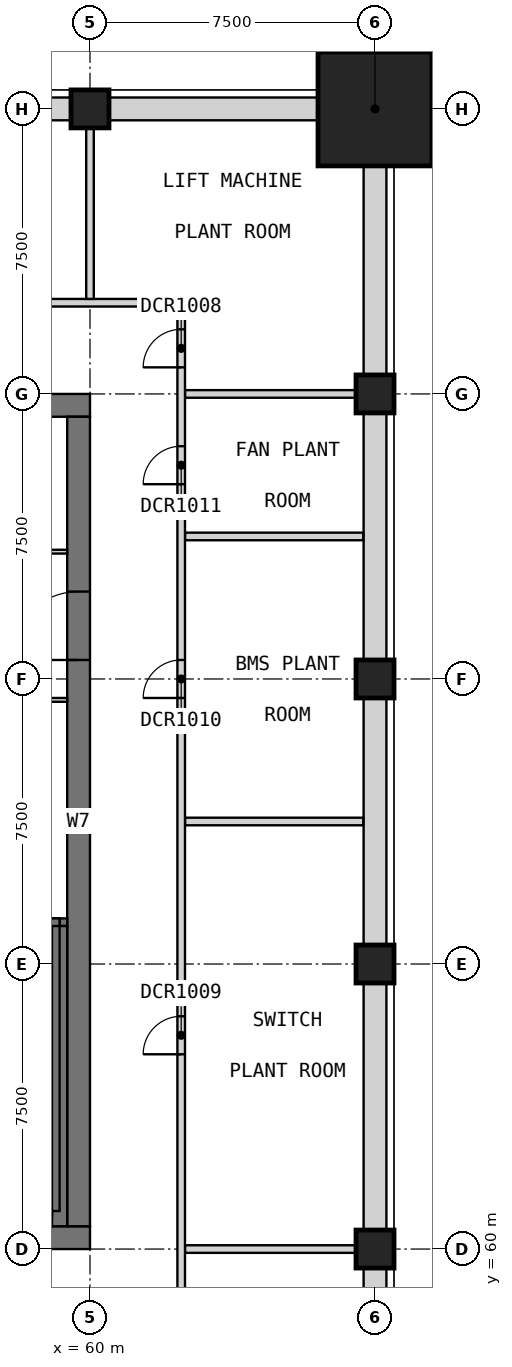
"""IFC4 building model, lengths in metres.
Left out: names, types, materials, properties, quantities, classifications, styles, units other than length and angle.
Written with IfcOpenShell. Run it as: python <this file> out.ifc"""

import sys

from ifc_helpers import new_model, si_unit, direction, frame, frame_2d, origin, origin_2d, place, context, subcontext, project, spatial, rectangle, extrude, element, fill, save


model = new_model("IFC4")
c1 = context("Model", 3, precision=1e-05, world=origin(), true_north=direction((0.0, 1.0)))
c2 = subcontext(c1, "Body", "Model", "MODEL_VIEW")
j1 = project(units=[si_unit("LENGTHUNIT", "METRE"), si_unit("PLANEANGLEUNIT", "RADIAN")], contexts=[c1])
p1 = place(None, origin())
s1 = spatial("IfcSite", under=j1, at=p1, CompositionType="ELEMENT")
p2 = place(p1, origin())
s2 = spatial("IfcBuilding", under=s1, at=p2, CompositionType="ELEMENT")
p3 = place(p2, frame((0.0, 0.0, 320.2)))
s3 = spatial("IfcBuildingStorey", under=s2, at=p3, CompositionType="ELEMENT", Elevation=320.2)
for number, where, z_axis, x_axis in (
    (1, (60.0, 90.0, 0.0), (0.0, 0.0, 1.0), (1.0, 0.0, 0.0)),
    (2, (67.5, 60.0, 0.0), (0.0, 0.0, 1.0), (1.0, 0.0, 0.0)),
    (3, (67.5, 67.5, 0.0), (0.0, 0.0, 1.0), (1.0, 0.0, 0.0)),
    (4, (67.5, 75.0, 0.0), (0.0, 0.0, 1.0), (1.0, 0.0, 0.0)),
    (5, (67.5, 82.5, 0.0), (0.0, 0.0, 1.0), (1.0, 0.0, 0.0)),
):
    element("IfcColumn", number, at=place(p3, frame(where, z_axis=z_axis, x_axis=x_axis)), inside=s3, PredefinedType="COLUMN", context=c2, shape_type="SweptSolid", body=[
        extrude(rectangle(XDim=1.0, YDim=1.0, at=origin_2d()), origin(), (0.0, 0.0, 1.0), 8.0),
    ])
p4 = place(p3, frame((67.5, 90.0, 0.0), z_axis=(0.0, 0.0, 1.0), x_axis=(1.0, 0.0, 0.0)))
e6 = element("IfcColumn", 6, at=p4, inside=s3, PredefinedType="COLUMN", context=c2, shape_type="SweptSolid", body=[
    extrude(rectangle(XDim=3.0, YDim=3.0, at=origin_2d()), origin(), (0.0, 0.0, 1.0), 8.0),
])
p5 = place(p3, frame((30.0, 60.3, 0.0), z_axis=(0.0, 0.0, 1.0), x_axis=(1.0, 0.0, 0.0)))
e7 = element("IfcWall", 7, at=p5, inside=s3, PredefinedType="SHEAR", context=c2, shape_type="SweptSolid", body=[
    extrude(rectangle(XDim=30.0, YDim=0.6, at=frame_2d((15.0, 0.0))), origin(), (0.0, 0.0, 1.0), 7.7),
])
p6 = place(p5, frame((21.9, 0.0, 0.0)))
e8 = element("IfcOpeningElement", 8, at=p6, cuts=e7, PredefinedType="OPENING", context=c2, shape_type="SweptSolid", body=[
    extrude(rectangle(XDim=1.8, YDim=2.1, at=frame_2d((0.9, 1.05))), frame((0.0, 0.31, 0.0), z_axis=(0.0, -1.0, 0.0), x_axis=(1.0, 0.0, 0.0)), (0.0, 0.0, 1.0), 0.62),
])
p7 = place(p5, frame((26.5, 0.0, 0.0)))
e9 = element("IfcOpeningElement", 9, at=p7, cuts=e7, PredefinedType="OPENING", context=c2, shape_type="SweptSolid", body=[
    extrude(rectangle(XDim=1.2, YDim=2.1, at=frame_2d((0.6, 1.05))), frame((0.0, 0.31, 0.0), z_axis=(0.0, -1.0, 0.0), x_axis=(1.0, 0.0, 0.0)), (0.0, 0.0, 1.0), 0.62),
])
p8 = place(p3, frame((30.0, 82.2, 0.0), z_axis=(0.0, 0.0, 1.0), x_axis=(1.0, 0.0, 0.0)))
e10 = element("IfcWall", 10, at=p8, inside=s3, PredefinedType="SHEAR", context=c2, shape_type="SweptSolid", body=[
    extrude(rectangle(XDim=30.0, YDim=0.6, at=frame_2d((15.0, 0.0))), origin(), (0.0, 0.0, 1.0), 7.7),
])
p9 = place(p3, frame((59.7, 60.6, 0.0), z_axis=(0.0, 0.0, 1.0), x_axis=(0.0, 1.0, 0.0)))
e11 = element("IfcWall", 11, at=p9, inside=s3, PredefinedType="SHEAR", context=c2, shape_type="SweptSolid", body=[
    extrude(rectangle(XDim=21.3, YDim=0.6, at=frame_2d((10.65, 0.0))), origin(), (0.0, 0.0, 1.0), 7.7),
])
p10 = place(p9, frame((14.9, 0.0, 0.0)))
e12 = element("IfcOpeningElement", 12, at=p10, cuts=e11, PredefinedType="OPENING", context=c2, shape_type="SweptSolid", body=[
    extrude(rectangle(XDim=1.8, YDim=2.1, at=frame_2d((0.9, 1.05))), frame((0.0, 0.31, 0.0), z_axis=(0.0, -1.0, 0.0), x_axis=(1.0, 0.0, 0.0)), (0.0, 0.0, 1.0), 0.62),
])
p11 = place(p3, frame((67.5, 54.0, 0.0), z_axis=(0.0, 0.0, 1.0), x_axis=(0.0, 1.0, 0.0)))
e13 = element("IfcWall", 13, at=p11, inside=s3, PredefinedType="ELEMENTEDWALL", context=c2, shape_type="SweptSolid", body=[
    extrude(rectangle(XDim=5.5, YDim=0.6, at=frame_2d((2.75, 0.0))), origin(), (0.0, 0.0, 1.0), 7.7),
])
for number, where, z_axis, x_axis in (
    (14, (67.5, 60.5, 0.0), (0.0, 0.0, 1.0), (0.0, 1.0, 0.0)),
    (15, (67.5, 68.0, 0.0), (0.0, 0.0, 1.0), (0.0, 1.0, 0.0)),
    (16, (67.5, 75.5, 0.0), (0.0, 0.0, 1.0), (0.0, 1.0, 0.0)),
):
    element("IfcWall", number, at=place(p3, frame(where, z_axis=z_axis, x_axis=x_axis)), inside=s3, PredefinedType="ELEMENTEDWALL", context=c2, shape_type="SweptSolid", body=[
        extrude(rectangle(XDim=6.5, YDim=0.6, at=frame_2d((3.25, 0.0))), origin(), (0.0, 0.0, 1.0), 6.8),
    ])
for number, where, z_axis, x_axis in (
    (17, (67.5, 83.0, 0.0), (0.0, 0.0, 1.0), (0.0, 1.0, 0.0)),
    (18, (66.0, 90.0, 0.0), (0.0, 0.0, 1.0), (-1.0, 0.0, 0.0)),
):
    element("IfcWall", number, at=place(p3, frame(where, z_axis=z_axis, x_axis=x_axis)), inside=s3, PredefinedType="ELEMENTEDWALL", context=c2, shape_type="SweptSolid", body=[
        extrude(rectangle(XDim=5.5, YDim=0.6, at=frame_2d((2.75, 0.0))), origin(), (0.0, 0.0, 1.0), 7.7),
    ])
p12 = place(p3, frame((59.5, 90.0, 0.0), z_axis=(0.0, 0.0, 1.0), x_axis=(-1.0, 0.0, 0.0)))
e19 = element("IfcWall", 19, at=p12, inside=s3, PredefinedType="ELEMENTEDWALL", context=c2, shape_type="SweptSolid", body=[
    extrude(rectangle(XDim=6.5, YDim=0.6, at=frame_2d((3.25, 0.0))), origin(), (0.0, 0.0, 1.0), 6.8),
])
p13 = place(p3, frame((51.1, 68.6, 0.0), z_axis=(0.0, 0.0, 1.0), x_axis=(1.0, 0.0, 0.0)))
e20 = element("IfcWall", 20, at=p13, inside=s3, PredefinedType="SOLIDWALL", context=c2, shape_type="SweptSolid", body=[
    extrude(rectangle(XDim=8.3, YDim=0.2, at=frame_2d((4.15, 0.0))), origin(), (0.0, 0.0, 1.0), 7.7),
])
p14 = place(p3, frame((59.2, 60.6, 0.0), z_axis=(0.0, 0.0, 1.0), x_axis=(0.0, 1.0, 0.0)))
e21 = element("IfcWall", 21, at=p14, inside=s3, PredefinedType="SOLIDWALL", context=c2, shape_type="SweptSolid", body=[
    extrude(rectangle(XDim=7.9, YDim=0.4, at=frame_2d((3.95, 0.0))), origin(), (0.0, 0.0, 1.0), 7.7),
])
p15 = place(p3, frame((51.1, 74.45, 0.0), z_axis=(0.0, 0.0, 1.0), x_axis=(1.0, 0.0, 0.0)))
e22 = element("IfcWall", 22, at=p15, inside=s3, PredefinedType="PARTITIONING", context=c2, shape_type="SweptSolid", body=[
    extrude(rectangle(XDim=8.3, YDim=0.1, at=frame_2d((4.15, 0.0))), origin(), (0.0, 0.0, 1.0), 7.7),
])
p16 = place(p15, frame((3.7, 0.0, 0.0)))
e23 = element("IfcOpeningElement", 23, at=p16, cuts=e22, PredefinedType="OPENING", context=c2, shape_type="SweptSolid", body=[
    extrude(rectangle(XDim=0.9, YDim=2.1, at=frame_2d((0.45, 1.05))), frame((0.0, 0.06, 0.0), z_axis=(0.0, -1.0, 0.0), x_axis=(1.0, 0.0, 0.0)), (0.0, 0.0, 1.0), 0.12),
])
p17 = place(p3, frame((51.1, 78.35, 0.0), z_axis=(0.0, 0.0, 1.0), x_axis=(1.0, 0.0, 0.0)))
e24 = element("IfcWall", 24, at=p17, inside=s3, PredefinedType="PARTITIONING", context=c2, shape_type="SweptSolid", body=[
    extrude(rectangle(XDim=8.3, YDim=0.1, at=frame_2d((4.15, 0.0))), origin(), (0.0, 0.0, 1.0), 7.7),
])
p18 = place(p17, frame((2.05, 0.0, 0.0)))
e25 = element("IfcOpeningElement", 25, at=p18, cuts=e24, PredefinedType="OPENING", context=c2, shape_type="SweptSolid", body=[
    extrude(rectangle(XDim=0.9, YDim=2.1, at=frame_2d((0.45, 1.05))), frame((0.0, 0.06, 0.0), z_axis=(0.0, -1.0, 0.0), x_axis=(1.0, 0.0, 0.0)), (0.0, 0.0, 1.0), 0.12),
])
p19 = place(p17, frame((6.2, 0.0, 0.0)))
e26 = element("IfcOpeningElement", 26, at=p19, cuts=e24, PredefinedType="OPENING", context=c2, shape_type="SweptSolid", body=[
    extrude(rectangle(XDim=0.9, YDim=2.1, at=frame_2d((0.45, 1.05))), frame((0.0, 0.06, 0.0), z_axis=(0.0, -1.0, 0.0), x_axis=(1.0, 0.0, 0.0)), (0.0, 0.0, 1.0), 0.12),
])
p20 = place(p3, frame((59.1, 61.0, 8.0), z_axis=(0.0, 0.0, 1.0), x_axis=(0.0, 1.0, 0.0)))
e27 = element("IfcWall", 27, at=p20, inside=s3, PredefinedType="SOLIDWALL", context=c2, shape_type="SweptSolid", body=[
    extrude(rectangle(XDim=7.7, YDim=0.2, at=frame_2d((3.85, 0.0))), origin(), (0.0, 0.0, 1.0), 2.7),
])
p21 = place(p3, frame((55.0, 68.6, 8.0), z_axis=(0.0, 0.0, 1.0), x_axis=(1.0, 0.0, 0.0)))
e28 = element("IfcWall", 28, at=p21, inside=s3, PredefinedType="SOLIDWALL", context=c2, shape_type="SweptSolid", body=[
    extrude(rectangle(XDim=4.2, YDim=0.2, at=frame_2d((2.1, 0.0))), origin(), (0.0, 0.0, 1.0), 2.7),
])
p22 = place(p3, frame((62.5, 60.0, 0.0), z_axis=(0.0, 0.0, 1.0), x_axis=(1.0, 0.0, 0.0)))
e29 = element("IfcWall", 29, at=p22, inside=s3, PredefinedType="PARTITIONING", context=c2, shape_type="SweptSolid", body=[
    extrude(rectangle(XDim=5.0, YDim=0.2, at=frame_2d((2.5, 0.0))), origin(), (0.0, 0.0, 1.0), 6.2),
])
for number, where, z_axis, x_axis in (
    (30, (62.5, 71.25, 0.0), (0.0, 0.0, 1.0), (1.0, 0.0, 0.0)),
    (31, (62.5, 78.75, 0.0), (0.0, 0.0, 1.0), (1.0, 0.0, 0.0)),
):
    element("IfcWall", number, at=place(p3, frame(where, z_axis=z_axis, x_axis=x_axis)), inside=s3, PredefinedType="PARTITIONING", context=c2, shape_type="SweptSolid", body=[
        extrude(rectangle(XDim=4.69, YDim=0.2, at=frame_2d((2.345, 0.0))), origin(), (0.0, 0.0, 1.0), 7.7),
    ])
p23 = place(p3, frame((62.5, 82.5, 0.0), z_axis=(0.0, 0.0, 1.0), x_axis=(1.0, 0.0, 0.0)))
e32 = element("IfcWall", 32, at=p23, inside=s3, PredefinedType="PARTITIONING", context=c2, shape_type="SweptSolid", body=[
    extrude(rectangle(XDim=5.0, YDim=0.2, at=frame_2d((2.5, 0.0))), origin(), (0.0, 0.0, 1.0), 6.2),
])
p24 = place(p3, frame((33.75, 84.9, 0.0), z_axis=(0.0, 0.0, 1.0), x_axis=(1.0, 0.0, 0.0)))
e33 = element("IfcWall", 33, at=p24, inside=s3, PredefinedType="PARTITIONING", context=c2, shape_type="SweptSolid", body=[
    extrude(rectangle(XDim=28.65, YDim=0.2, at=frame_2d((14.325, 0.0))), origin(), (0.0, 0.0, 1.0), 7.7),
])
p25 = place(p24, frame((1.375, 0.0, 0.0)))
e34 = element("IfcOpeningElement", 34, at=p25, cuts=e33, PredefinedType="OPENING", context=c2, shape_type="SweptSolid", body=[
    extrude(rectangle(XDim=1.0, YDim=2.1, at=frame_2d((0.5, 1.05))), frame((0.0, 0.11, 0.0), z_axis=(0.0, -1.0, 0.0), x_axis=(1.0, 0.0, 0.0)), (0.0, 0.0, 1.0), 0.22),
])
p26 = place(p24, frame((7.0, 0.0, 0.0)))
e35 = element("IfcOpeningElement", 35, at=p26, cuts=e33, PredefinedType="OPENING", context=c2, shape_type="SweptSolid", body=[
    extrude(rectangle(XDim=1.0, YDim=2.1, at=frame_2d((0.5, 1.05))), frame((0.0, 0.11, 0.0), z_axis=(0.0, -1.0, 0.0), x_axis=(1.0, 0.0, 0.0)), (0.0, 0.0, 1.0), 0.22),
])
p27 = place(p24, frame((18.25, 0.0, 0.0)))
e36 = element("IfcOpeningElement", 36, at=p27, cuts=e33, PredefinedType="OPENING", context=c2, shape_type="SweptSolid", body=[
    extrude(rectangle(XDim=1.0, YDim=2.1, at=frame_2d((0.5, 1.05))), frame((0.0, 0.11, 0.0), z_axis=(0.0, -1.0, 0.0), x_axis=(1.0, 0.0, 0.0)), (0.0, 0.0, 1.0), 0.22),
])
p28 = place(p3, frame((60.0, 85.0, 0.0), z_axis=(0.0, 0.0, 1.0), x_axis=(0.0, 1.0, 0.0)))
e37 = element("IfcWall", 37, at=p28, inside=s3, PredefinedType="PARTITIONING", context=c2, shape_type="SweptSolid", body=[
    extrude(rectangle(XDim=5.5, YDim=0.2, at=frame_2d((2.75, 0.0))), origin(), (0.0, 0.0, 1.0), 6.2),
])
p29 = place(p3, frame((62.4, 57.7, 0.0), z_axis=(0.0, 0.0, 1.0), x_axis=(0.0, 1.0, 0.0)))
e38 = element("IfcWall", 38, at=p29, inside=s3, PredefinedType="PARTITIONING", context=c2, shape_type="SweptSolid", body=[
    extrude(rectangle(XDim=27.1, YDim=0.2, at=frame_2d((13.55, 0.0))), origin(), (0.0, 0.0, 1.0), 7.7),
])
p30 = place(p29, frame((25.5, 0.0, 0.0)))
e39 = element("IfcOpeningElement", 39, at=p30, cuts=e38, PredefinedType="OPENING", context=c2, shape_type="SweptSolid", body=[
    extrude(rectangle(XDim=1.0, YDim=2.1, at=frame_2d((0.5, 1.05))), frame((0.0, 0.11, 0.0), z_axis=(0.0, -1.0, 0.0), x_axis=(1.0, 0.0, 0.0)), (0.0, 0.0, 1.0), 0.22),
])
p31 = place(p29, frame((7.425, 0.0, 0.0)))
e40 = element("IfcOpeningElement", 40, at=p31, cuts=e38, PredefinedType="OPENING", context=c2, shape_type="SweptSolid", body=[
    extrude(rectangle(XDim=1.0, YDim=2.1, at=frame_2d((0.5, 1.05))), frame((0.0, 0.11, 0.0), z_axis=(0.0, -1.0, 0.0), x_axis=(1.0, 0.0, 0.0)), (0.0, 0.0, 1.0), 0.22),
])
p32 = place(p29, frame((16.8, 0.0, 0.0)))
e41 = element("IfcOpeningElement", 41, at=p32, cuts=e38, PredefinedType="OPENING", context=c2, shape_type="SweptSolid", body=[
    extrude(rectangle(XDim=1.0, YDim=2.1, at=frame_2d((0.5, 1.05))), frame((0.0, 0.11, 0.0), z_axis=(0.0, -1.0, 0.0), x_axis=(1.0, 0.0, 0.0)), (0.0, 0.0, 1.0), 0.22),
])
p33 = place(p29, frame((22.425, 0.0, 0.0)))
e42 = element("IfcOpeningElement", 42, at=p33, cuts=e38, PredefinedType="OPENING", context=c2, shape_type="SweptSolid", body=[
    extrude(rectangle(XDim=1.0, YDim=2.1, at=frame_2d((0.5, 1.05))), frame((0.0, 0.11, 0.0), z_axis=(0.0, -1.0, 0.0), x_axis=(1.0, 0.0, 0.0)), (0.0, 0.0, 1.0), 0.22),
])
p34 = place(p10, origin())
e43 = element("IfcDoor", 43, at=p34, inside=s3, OperationType="DOUBLE_DOOR_SINGLE_SWING", PredefinedType="DOOR", context=c2, shape_type="SweptSolid", body=[
    extrude(rectangle(XDim=1.8, YDim=2.1, at=frame_2d((0.9, 1.05))), frame((0.0, 0.025, 0.0), z_axis=(0.0, -1.0, 0.0), x_axis=(1.0, 0.0, 0.0)), (0.0, 0.0, 1.0), 0.05),
])
fill(e12, e43)
p35 = place(p30, origin())
e44 = element("IfcDoor", 44, at=p35, inside=s3, OperationType="SINGLE_SWING_LEFT", PredefinedType="DOOR", context=c2, shape_type="SweptSolid", body=[
    extrude(rectangle(XDim=1.0, YDim=2.1, at=frame_2d((0.5, 1.05))), frame((0.0, 0.025, 0.0), z_axis=(0.0, -1.0, 0.0), x_axis=(1.0, 0.0, 0.0)), (0.0, 0.0, 1.0), 0.05),
])
fill(e39, e44)
p36 = place(p31, origin())
e45 = element("IfcDoor", 45, at=p36, inside=s3, OperationType="SINGLE_SWING_RIGHT", PredefinedType="DOOR", context=c2, shape_type="SweptSolid", body=[
    extrude(rectangle(XDim=1.0, YDim=2.1, at=frame_2d((0.5, 1.05))), frame((0.0, 0.025, 0.0), z_axis=(0.0, -1.0, 0.0), x_axis=(1.0, 0.0, 0.0)), (0.0, 0.0, 1.0), 0.05),
])
fill(e40, e45)
p37 = place(p32, origin())
e46 = element("IfcDoor", 46, at=p37, inside=s3, OperationType="SINGLE_SWING_RIGHT", PredefinedType="DOOR", context=c2, shape_type="SweptSolid", body=[
    extrude(rectangle(XDim=1.0, YDim=2.1, at=frame_2d((0.5, 1.05))), frame((0.0, 0.025, 0.0), z_axis=(0.0, -1.0, 0.0), x_axis=(1.0, 0.0, 0.0)), (0.0, 0.0, 1.0), 0.05),
])
fill(e41, e46)
p38 = place(p33, origin())
e47 = element("IfcDoor", 47, at=p38, inside=s3, OperationType="SINGLE_SWING_RIGHT", PredefinedType="DOOR", context=c2, shape_type="SweptSolid", body=[
    extrude(rectangle(XDim=1.0, YDim=2.1, at=frame_2d((0.5, 1.05))), frame((0.0, 0.025, 0.0), z_axis=(0.0, -1.0, 0.0), x_axis=(1.0, 0.0, 0.0)), (0.0, 0.0, 1.0), 0.05),
])
fill(e42, e47)
save(model, sys.argv[1])
